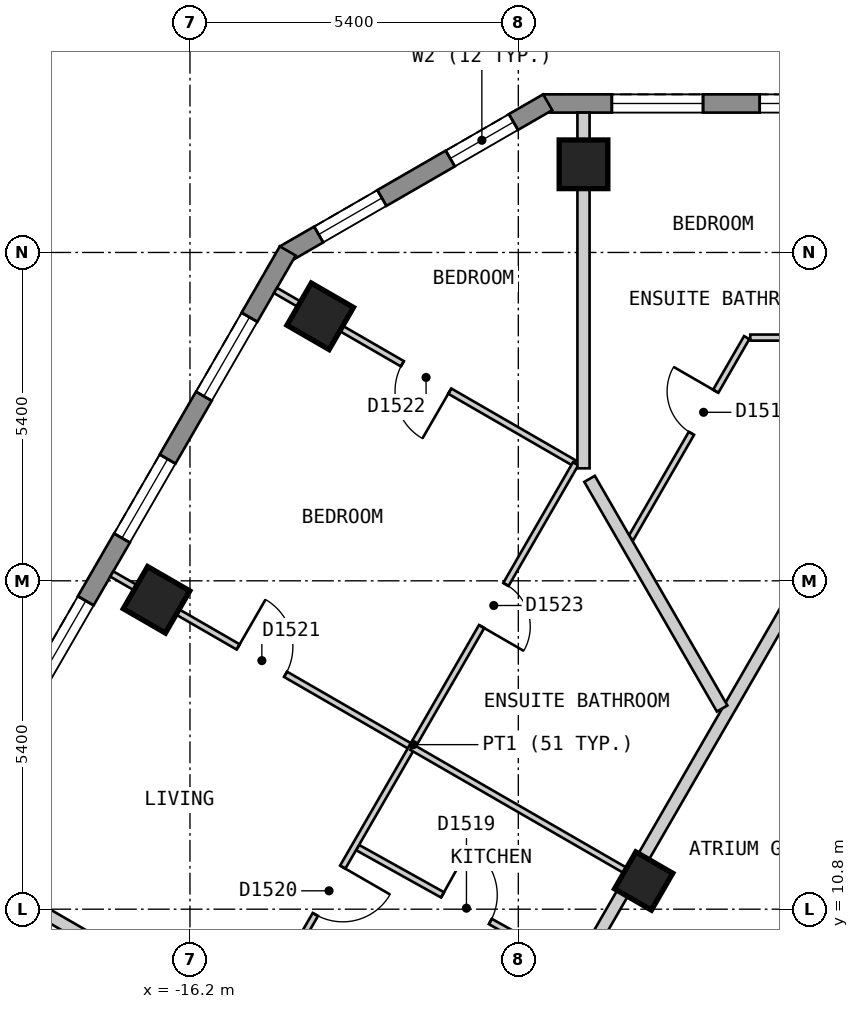
"""IFC4 building model, lengths in metres.
Left out: names, types, materials, properties, quantities, classifications, styles, units other than length and angle.
Written with IfcOpenShell. Run it as: python <this file> out.ifc"""

import sys

from ifc_helpers import new_model, si_unit, direction, frame, frame_2d, origin, origin_2d, place, context, subcontext, project, spatial, polyline, rectangle, outline, extrude, element, fill, save


model = new_model("IFC4")
c1 = context("Model", 3, precision=1e-05, world=origin(), true_north=direction((0.0, 1.0)))
c2 = subcontext(c1, "Body", "Model", "MODEL_VIEW")
j1 = project(units=[si_unit("LENGTHUNIT", "METRE"), si_unit("PLANEANGLEUNIT", "RADIAN")], contexts=[c1])
p1 = place(None, origin())
s1 = spatial("IfcSite", under=j1, at=p1, CompositionType="ELEMENT")
p2 = place(p1, origin())
s2 = spatial("IfcBuilding", under=s1, at=p2, CompositionType="ELEMENT")
p3 = place(p2, frame((0.0, 0.0, 190.2)))
s3 = spatial("IfcBuildingStorey", under=s2, at=p3, CompositionType="ELEMENT", Elevation=190.2)
for number, where, z_axis, x_axis in (
    (1, (-9.728, 23.05, 0.0), (0.0, 0.0, 1.0), (-1.0, 0.0, 0.0)),
    (2, (-14.058, 20.55, 0.0), (0.0, 0.0, 1.0), (-0.5, -0.866, 0.0)),
    (3, (-16.75, 15.888, 0.0), (0.0, 0.0, 1.0), (-0.5, -0.866, 0.0)),
):
    element("IfcColumn", number, at=place(p3, frame(where, z_axis=z_axis, x_axis=x_axis)), inside=s3, PredefinedType="COLUMN", context=c2, shape_type="SweptSolid", body=[
        extrude(rectangle(XDim=0.8, YDim=0.8, at=origin_2d()), origin(), (0.0, 0.0, 1.0), 3.0),
    ])
p4 = place(p3, frame((-8.739, 11.263, 0.0), z_axis=(0.0, 0.0, 1.0), x_axis=(-0.5, -0.866025403784, 0.0)))
e4 = element("IfcColumn", 4, at=p4, inside=s3, PredefinedType="COLUMN", context=c2, shape_type="SweptSolid", body=[
    extrude(rectangle(XDim=0.7, YDim=0.7, at=origin_2d()), origin(), (0.0, 0.0, 1.0), 3.0),
])
p5 = place(p3, frame((10.392, 24.05, 0.0), z_axis=(0.0, 0.0, 1.0), x_axis=(-1.0, 0.0, 0.0)))
e5 = element("IfcWall", 5, at=p5, inside=s3, PredefinedType="SOLIDWALL", context=c2, shape_type="SweptSolid", body=[
    extrude(outline(polyline([(0.0, -0.15), (20.784, -0.15), (20.704, 0.15), (0.08, 0.15), (0.0, -0.15)])), origin(), (0.0, 0.0, 1.0), 2.7),
])
p6 = place(p5, frame((1.13, 0.0, 0.15)))
e6 = element("IfcOpeningElement", 6, at=p6, cuts=e5, PredefinedType="OPENING", context=c2, shape_type="SweptSolid", body=[
    extrude(rectangle(XDim=1.5, YDim=2.1, at=frame_2d((0.75, 1.05))), frame((0.0, 0.16, 0.0), z_axis=(0.0, -1.0, 0.0), x_axis=(1.0, 0.0, 0.0)), (0.0, 0.0, 1.0), 0.32),
])
p7 = place(p5, frame((3.562, 0.0, 0.15)))
e7 = element("IfcOpeningElement", 7, at=p7, cuts=e5, PredefinedType="OPENING", context=c2, shape_type="SweptSolid", body=[
    extrude(rectangle(XDim=1.5, YDim=2.1, at=frame_2d((0.75, 1.05))), frame((0.0, 0.16, 0.0), z_axis=(0.0, -1.0, 0.0), x_axis=(1.0, 0.0, 0.0)), (0.0, 0.0, 1.0), 0.32),
])
p8 = place(p5, frame((5.994, 0.0, 0.15)))
e8 = element("IfcOpeningElement", 8, at=p8, cuts=e5, PredefinedType="OPENING", context=c2, shape_type="SweptSolid", body=[
    extrude(rectangle(XDim=1.5, YDim=2.1, at=frame_2d((0.75, 1.05))), frame((0.0, 0.16, 0.0), z_axis=(0.0, -1.0, 0.0), x_axis=(1.0, 0.0, 0.0)), (0.0, 0.0, 1.0), 0.32),
])
p9 = place(p5, frame((8.426, 0.0, 0.15)))
e9 = element("IfcOpeningElement", 9, at=p9, cuts=e5, PredefinedType="OPENING", context=c2, shape_type="SweptSolid", body=[
    extrude(rectangle(XDim=1.5, YDim=2.1, at=frame_2d((0.75, 1.05))), frame((0.0, 0.16, 0.0), z_axis=(0.0, -1.0, 0.0), x_axis=(1.0, 0.0, 0.0)), (0.0, 0.0, 1.0), 0.32),
])
p10 = place(p5, frame((10.858, 0.0, 0.15)))
e10 = element("IfcOpeningElement", 10, at=p10, cuts=e5, PredefinedType="OPENING", context=c2, shape_type="SweptSolid", body=[
    extrude(rectangle(XDim=1.5, YDim=2.1, at=frame_2d((0.75, 1.05))), frame((0.0, 0.16, 0.0), z_axis=(0.0, -1.0, 0.0), x_axis=(1.0, 0.0, 0.0)), (0.0, 0.0, 1.0), 0.32),
])
p11 = place(p5, frame((13.29, 0.0, 0.15)))
e11 = element("IfcOpeningElement", 11, at=p11, cuts=e5, PredefinedType="OPENING", context=c2, shape_type="SweptSolid", body=[
    extrude(rectangle(XDim=1.5, YDim=2.1, at=frame_2d((0.75, 1.05))), frame((0.0, 0.16, 0.0), z_axis=(0.0, -1.0, 0.0), x_axis=(1.0, 0.0, 0.0)), (0.0, 0.0, 1.0), 0.32),
])
p12 = place(p5, frame((15.722, 0.0, 0.15)))
e12 = element("IfcOpeningElement", 12, at=p12, cuts=e5, PredefinedType="OPENING", context=c2, shape_type="SweptSolid", body=[
    extrude(rectangle(XDim=1.5, YDim=2.1, at=frame_2d((0.75, 1.05))), frame((0.0, 0.16, 0.0), z_axis=(0.0, -1.0, 0.0), x_axis=(1.0, 0.0, 0.0)), (0.0, 0.0, 1.0), 0.32),
])
p13 = place(p5, frame((18.154, 0.0, 0.15)))
e13 = element("IfcOpeningElement", 13, at=p13, cuts=e5, PredefinedType="OPENING", context=c2, shape_type="SweptSolid", body=[
    extrude(rectangle(XDim=1.5, YDim=2.1, at=frame_2d((0.75, 1.05))), frame((0.0, 0.16, 0.0), z_axis=(0.0, -1.0, 0.0), x_axis=(1.0, 0.0, 0.0)), (0.0, 0.0, 1.0), 0.32),
])
p14 = place(p3, frame((-10.317, 24.07, 0.0), z_axis=(0.0, 0.0, 1.0), x_axis=(-0.866022959057, -0.500004234368, 0.0)))
e14 = element("IfcWall", 14, at=p14, inside=s3, PredefinedType="SOLIDWALL", context=c2, shape_type="SweptSolid", body=[
    extrude(outline(polyline([(0.0, -0.15), (5.0, -0.15), (4.92, 0.15), (0.08, 0.15), (0.0, -0.15)])), origin(), (0.0, 0.0, 1.0), 2.7),
])
p15 = place(p14, frame((0.65, 0.0, 0.15)))
e15 = element("IfcOpeningElement", 15, at=p15, cuts=e14, PredefinedType="OPENING", context=c2, shape_type="SweptSolid", body=[
    extrude(rectangle(XDim=1.2, YDim=2.1, at=frame_2d((0.6, 1.05))), frame((0.0, 0.16, 0.0), z_axis=(0.0, -1.0, 0.0), x_axis=(1.0, 0.0, 0.0)), (0.0, 0.0, 1.0), 0.32),
])
p16 = place(p14, frame((3.149, 0.0, 0.15)))
e16 = element("IfcOpeningElement", 16, at=p16, cuts=e14, PredefinedType="OPENING", context=c2, shape_type="SweptSolid", body=[
    extrude(rectangle(XDim=1.2, YDim=2.1, at=frame_2d((0.6, 1.05))), frame((0.0, 0.16, 0.0), z_axis=(0.0, -1.0, 0.0), x_axis=(1.0, 0.0, 0.0)), (0.0, 0.0, 1.0), 0.32),
])
p17 = place(p3, frame((-14.592, 21.625, 0.0), z_axis=(0.0, 0.0, 1.0), x_axis=(-0.500010537973, -0.866019319597, 0.0)))
e17 = element("IfcWall", 17, at=p17, inside=s3, PredefinedType="SOLIDWALL", context=c2, shape_type="SweptSolid", body=[
    extrude(outline(polyline([(0.0, -0.15), (22.863, -0.15), (22.783, 0.15), (0.08, 0.15), (0.0, -0.15)])), origin(), (0.0, 0.0, 1.0), 2.7),
])
p18 = place(p17, frame((1.259, 0.0, 0.15)))
e18 = element("IfcOpeningElement", 18, at=p18, cuts=e17, PredefinedType="OPENING", context=c2, shape_type="SweptSolid", body=[
    extrude(rectangle(XDim=1.5, YDim=2.1, at=frame_2d((0.75, 1.05))), frame((0.0, 0.16, 0.0), z_axis=(0.0, -1.0, 0.0), x_axis=(1.0, 0.0, 0.0)), (0.0, 0.0, 1.0), 0.32),
])
p19 = place(p17, frame((3.952, 0.0, 0.15)))
e19 = element("IfcOpeningElement", 19, at=p19, cuts=e17, PredefinedType="OPENING", context=c2, shape_type="SweptSolid", body=[
    extrude(rectangle(XDim=1.5, YDim=2.1, at=frame_2d((0.75, 1.05))), frame((0.0, 0.16, 0.0), z_axis=(0.0, -1.0, 0.0), x_axis=(1.0, 0.0, 0.0)), (0.0, 0.0, 1.0), 0.32),
])
p20 = place(p17, frame((6.644, 0.0, 0.15)))
e20 = element("IfcOpeningElement", 20, at=p20, cuts=e17, PredefinedType="OPENING", context=c2, shape_type="SweptSolid", body=[
    extrude(rectangle(XDim=1.5, YDim=2.1, at=frame_2d((0.75, 1.05))), frame((0.0, 0.16, 0.0), z_axis=(0.0, -1.0, 0.0), x_axis=(1.0, 0.0, 0.0)), (0.0, 0.0, 1.0), 0.32),
])
p21 = place(p17, frame((9.335, 0.0, 0.15)))
e21 = element("IfcOpeningElement", 21, at=p21, cuts=e17, PredefinedType="OPENING", context=c2, shape_type="SweptSolid", body=[
    extrude(rectangle(XDim=1.5, YDim=2.1, at=frame_2d((0.75, 1.05))), frame((0.0, 0.16, 0.0), z_axis=(0.0, -1.0, 0.0), x_axis=(1.0, 0.0, 0.0)), (0.0, 0.0, 1.0), 0.32),
])
p22 = place(p17, frame((12.028, 0.0, 0.15)))
e22 = element("IfcOpeningElement", 22, at=p22, cuts=e17, PredefinedType="OPENING", context=c2, shape_type="SweptSolid", body=[
    extrude(rectangle(XDim=1.5, YDim=2.1, at=frame_2d((0.75, 1.05))), frame((0.0, 0.16, 0.0), z_axis=(0.0, -1.0, 0.0), x_axis=(1.0, 0.0, 0.0)), (0.0, 0.0, 1.0), 0.32),
])
p23 = place(p17, frame((14.72, 0.0, 0.15)))
e23 = element("IfcOpeningElement", 23, at=p23, cuts=e17, PredefinedType="OPENING", context=c2, shape_type="SweptSolid", body=[
    extrude(rectangle(XDim=1.5, YDim=2.1, at=frame_2d((0.75, 1.05))), frame((0.0, 0.16, 0.0), z_axis=(0.0, -1.0, 0.0), x_axis=(1.0, 0.0, 0.0)), (0.0, 0.0, 1.0), 0.32),
])
p24 = place(p17, frame((17.411, 0.0, 0.15)))
e24 = element("IfcOpeningElement", 24, at=p24, cuts=e17, PredefinedType="OPENING", context=c2, shape_type="SweptSolid", body=[
    extrude(rectangle(XDim=1.5, YDim=2.1, at=frame_2d((0.75, 1.05))), frame((0.0, 0.16, 0.0), z_axis=(0.0, -1.0, 0.0), x_axis=(1.0, 0.0, 0.0)), (0.0, 0.0, 1.0), 0.32),
])
p25 = place(p17, frame((20.104, 0.0, 0.15)))
e25 = element("IfcOpeningElement", 25, at=p25, cuts=e17, PredefinedType="OPENING", context=c2, shape_type="SweptSolid", body=[
    extrude(rectangle(XDim=1.5, YDim=2.1, at=frame_2d((0.75, 1.05))), frame((0.0, 0.16, 0.0), z_axis=(0.0, -1.0, 0.0), x_axis=(1.0, 0.0, 0.0)), (0.0, 0.0, 1.0), 0.32),
])
p26 = place(p3, frame((-10.854, 8.0, 0.0), z_axis=(0.0, 0.0, 1.0), x_axis=(0.499997637144, 0.866026767976, 0.0)))
e26 = element("IfcWall", 26, at=p26, inside=s3, PredefinedType="PARTITIONING", context=c2, shape_type="SweptSolid", body=[
    extrude(rectangle(XDim=10.854, YDim=0.2, at=frame_2d((5.427, 0.0))), origin(), (0.0, 0.0, 1.0), 2.7),
])
p27 = place(p26, frame((0.721, 0.0, 0.0)))
e27 = element("IfcOpeningElement", 27, at=p27, cuts=e26, PredefinedType="OPENING", context=c2, shape_type="SweptSolid", body=[
    extrude(rectangle(XDim=1.0, YDim=2.1, at=frame_2d((0.5, 1.05))), frame((0.0, 0.11, 0.0), z_axis=(0.0, -1.0, 0.0), x_axis=(1.0, 0.0, 0.0)), (0.0, 0.0, 1.0), 0.22),
])
p28 = place(p3, frame((-13.444, 11.814, 0.0), z_axis=(0.0, 0.0, 1.0), x_axis=(0.873653620945, -0.486548405207, 0.0)))
e28 = element("IfcWall", 28, at=p28, inside=s3, PredefinedType="PARTITIONING", context=c2, shape_type="SweptSolid", body=[
    extrude(rectangle(XDim=4.051, YDim=0.1, at=frame_2d((2.025, 0.0))), origin(), (0.0, 0.0, 1.0), 2.7),
])
p29 = place(p28, frame((1.6, 0.0, 0.0)))
e29 = element("IfcOpeningElement", 29, at=p29, cuts=e28, PredefinedType="OPENING", context=c2, shape_type="SweptSolid", body=[
    extrude(rectangle(XDim=0.9, YDim=2.1, at=frame_2d((0.45, 1.05))), frame((0.0, 0.06, 0.0), z_axis=(0.0, -1.0, 0.0), x_axis=(1.0, 0.0, 0.0)), (0.0, 0.0, 1.0), 0.12),
])
p30 = place(p3, frame((-17.486, 16.313, 0.0), z_axis=(0.0, 0.0, 1.0), x_axis=(0.866004402611, -0.500036373335, 0.0)))
e30 = element("IfcWall", 30, at=p30, inside=s3, PredefinedType="PARTITIONING", context=c2, shape_type="SweptSolid", body=[
    extrude(rectangle(XDim=5.7, YDim=0.1, at=frame_2d((2.85, 0.0))), origin(), (0.0, 0.0, 1.0), 2.7),
])
p31 = place(p30, frame((2.4, 0.0, 0.0)))
e31 = element("IfcOpeningElement", 31, at=p31, cuts=e30, PredefinedType="OPENING", context=c2, shape_type="SweptSolid", body=[
    extrude(rectangle(XDim=0.9, YDim=2.1, at=frame_2d((0.45, 1.05))), frame((0.0, 0.06, 0.0), z_axis=(0.0, -1.0, 0.0), x_axis=(1.0, 0.0, 0.0)), (0.0, 0.0, 1.0), 0.12),
])
p32 = place(p3, frame((-14.794, 20.975, 0.0), z_axis=(0.0, 0.0, 1.0), x_axis=(0.865989811779, -0.500061642096, 0.0)))
e32 = element("IfcWall", 32, at=p32, inside=s3, PredefinedType="PARTITIONING", context=c2, shape_type="SweptSolid", body=[
    extrude(rectangle(XDim=5.67, YDim=0.1, at=frame_2d((2.835, 0.0))), origin(), (0.0, 0.0, 1.0), 2.7),
])
p33 = place(p32, frame((2.41, 0.0, 0.0)))
e33 = element("IfcOpeningElement", 33, at=p33, cuts=e32, PredefinedType="OPENING", context=c2, shape_type="SweptSolid", body=[
    extrude(rectangle(XDim=0.9, YDim=2.1, at=frame_2d((0.45, 1.05))), frame((0.0, 0.06, 0.0), z_axis=(0.0, -1.0, 0.0), x_axis=(1.0, 0.0, 0.0)), (0.0, 0.0, 1.0), 0.12),
])
p34 = place(p3, frame((-6.985, 20.2, 0.0), z_axis=(0.0, 0.0, 1.0), x_axis=(1.0, 0.0, 0.0)))
e34 = element("IfcWall", 34, at=p34, inside=s3, PredefinedType="PARTITIONING", context=c2, shape_type="SweptSolid", body=[
    extrude(rectangle(XDim=2.071, YDim=0.1, at=frame_2d((1.036, 0.0))), origin(), (0.0, 0.0, 1.0), 2.7),
])
p35 = place(p3, frame((-8.949, 16.9, 0.0), z_axis=(0.0, 0.0, 1.0), x_axis=(0.499949850951, 0.866054355415, 0.0)))
e35 = element("IfcWall", 35, at=p35, inside=s3, PredefinedType="PARTITIONING", context=c2, shape_type="SweptSolid", body=[
    extrude(rectangle(XDim=3.811, YDim=0.1, at=frame_2d((1.905, 0.0))), origin(), (0.0, 0.0, 1.0), 2.7),
])
p36 = place(p35, frame((1.992, 0.0, 0.0)))
e36 = element("IfcOpeningElement", 36, at=p36, cuts=e35, PredefinedType="OPENING", context=c2, shape_type="SweptSolid", body=[
    extrude(rectangle(XDim=0.8, YDim=2.1, at=frame_2d((0.4, 1.05))), frame((0.0, 0.06, 0.0), z_axis=(0.0, -1.0, 0.0), x_axis=(1.0, 0.0, 0.0)), (0.0, 0.0, 1.0), 0.12),
])
p37 = place(p3, frame((-15.192, 8.887, 0.0), z_axis=(0.0, 0.0, 1.0), x_axis=(0.500028204665, 0.866009119201, 0.0)))
e37 = element("IfcWall", 37, at=p37, inside=s3, PredefinedType="PARTITIONING", context=c2, shape_type="SweptSolid", body=[
    extrude(rectangle(XDim=10.667, YDim=0.1, at=frame_2d((5.334, 0.0))), origin(), (0.0, 0.0, 1.0), 2.7),
])
p38 = place(p37, frame((2.108, 0.0, 0.0)))
e38 = element("IfcOpeningElement", 38, at=p38, cuts=e37, PredefinedType="OPENING", context=c2, shape_type="SweptSolid", body=[
    extrude(rectangle(XDim=0.9, YDim=2.1, at=frame_2d((0.45, 1.05))), frame((0.0, 0.06, 0.0), z_axis=(0.0, -1.0, 0.0), x_axis=(1.0, 0.0, 0.0)), (0.0, 0.0, 1.0), 0.12),
])
p39 = place(p37, frame((7.576, 0.0, 0.0)))
e39 = element("IfcOpeningElement", 39, at=p39, cuts=e37, PredefinedType="OPENING", context=c2, shape_type="SweptSolid", body=[
    extrude(rectangle(XDim=0.8, YDim=2.1, at=frame_2d((0.4, 1.05))), frame((0.0, 0.06, 0.0), z_axis=(0.0, -1.0, 0.0), x_axis=(1.0, 0.0, 0.0)), (0.0, 0.0, 1.0), 0.12),
])
p40 = place(p3, frame((-9.628, 17.877, 0.0), z_axis=(0.0, 0.0, 1.0), x_axis=(0.499890461358, -0.866088636713, 0.0)))
e40 = element("IfcWall", 40, at=p40, inside=s3, PredefinedType="PARTITIONING", context=c2, shape_type="SweptSolid", body=[
    extrude(rectangle(XDim=4.361, YDim=0.2, at=frame_2d((2.18, 0.0))), origin(), (0.0, 0.0, 1.0), 2.7),
])
p41 = place(p3, frame((-20.178, 11.65, 0.0), z_axis=(0.0, 0.0, 1.0), x_axis=(0.866022950691, -0.500004248858, 0.0)))
e41 = element("IfcWall", 41, at=p41, inside=s3, PredefinedType="PARTITIONING", context=c2, shape_type="SweptSolid", body=[
    extrude(rectangle(XDim=5.7, YDim=0.2, at=frame_2d((2.85, 0.0))), origin(), (0.0, 0.0, 1.0), 2.7),
])
p42 = place(p3, frame((-9.728, 18.05, 0.0), z_axis=(0.0, 0.0, 1.0), x_axis=(0.0, 1.0, 0.0)))
e42 = element("IfcWall", 42, at=p42, inside=s3, PredefinedType="PARTITIONING", context=c2, shape_type="SweptSolid", body=[
    extrude(rectangle(XDim=5.85, YDim=0.2, at=frame_2d((2.925, 0.0))), origin(), (0.0, 0.0, 1.0), 2.7),
])
p43 = place(p3, frame((-12.55, 13.463, 0.0), z_axis=(0.0, 0.0, 1.0), x_axis=(0.86606561423, -0.499930346997, 0.0)))
e43 = element("IfcWall", 43, at=p43, inside=s3, PredefinedType="PARTITIONING", context=c2, shape_type="SweptSolid", body=[
    extrude(rectangle(XDim=4.1, YDim=0.1, at=frame_2d((2.05, 0.0))), origin(), (0.0, 0.0, 1.0), 2.7),
])
p44 = place(p12, origin())
e44 = element("IfcWindow", 44, at=p44, inside=s3, PartitioningType="SINGLE_PANEL", PredefinedType="WINDOW", context=c2, shape_type="SweptSolid", body=[
    extrude(rectangle(XDim=1.5, YDim=2.1, at=frame_2d((0.75, 1.05))), frame((0.0, 0.03, 0.0), z_axis=(0.0, -1.0, 0.0), x_axis=(1.0, 0.0, 0.0)), (0.0, 0.0, 1.0), 0.06),
])
fill(e12, e44)
p45 = place(p13, origin())
e45 = element("IfcWindow", 45, at=p45, inside=s3, PartitioningType="SINGLE_PANEL", PredefinedType="WINDOW", context=c2, shape_type="SweptSolid", body=[
    extrude(rectangle(XDim=1.5, YDim=2.1, at=frame_2d((0.75, 1.05))), frame((0.0, 0.03, 0.0), z_axis=(0.0, -1.0, 0.0), x_axis=(1.0, 0.0, 0.0)), (0.0, 0.0, 1.0), 0.06),
])
fill(e13, e45)
p46 = place(p15, origin())
e46 = element("IfcWindow", 46, at=p46, inside=s3, PartitioningType="SINGLE_PANEL", PredefinedType="WINDOW", context=c2, shape_type="SweptSolid", body=[
    extrude(rectangle(XDim=1.2, YDim=2.1, at=frame_2d((0.6, 1.05))), frame((0.0, 0.03, 0.0), z_axis=(0.0, -1.0, 0.0), x_axis=(1.0, 0.0, 0.0)), (0.0, 0.0, 1.0), 0.06),
])
fill(e15, e46)
p47 = place(p16, origin())
e47 = element("IfcWindow", 47, at=p47, inside=s3, PartitioningType="SINGLE_PANEL", PredefinedType="WINDOW", context=c2, shape_type="SweptSolid", body=[
    extrude(rectangle(XDim=1.2, YDim=2.1, at=frame_2d((0.6, 1.05))), frame((0.0, 0.03, 0.0), z_axis=(0.0, -1.0, 0.0), x_axis=(1.0, 0.0, 0.0)), (0.0, 0.0, 1.0), 0.06),
])
fill(e16, e47)
p48 = place(p18, origin())
e48 = element("IfcWindow", 48, at=p48, inside=s3, PartitioningType="SINGLE_PANEL", PredefinedType="WINDOW", context=c2, shape_type="SweptSolid", body=[
    extrude(rectangle(XDim=1.5, YDim=2.1, at=frame_2d((0.75, 1.05))), frame((0.0, 0.03, 0.0), z_axis=(0.0, -1.0, 0.0), x_axis=(1.0, 0.0, 0.0)), (0.0, 0.0, 1.0), 0.06),
])
fill(e18, e48)
p49 = place(p19, origin())
e49 = element("IfcWindow", 49, at=p49, inside=s3, PartitioningType="SINGLE_PANEL", PredefinedType="WINDOW", context=c2, shape_type="SweptSolid", body=[
    extrude(rectangle(XDim=1.5, YDim=2.1, at=frame_2d((0.75, 1.05))), frame((0.0, 0.03, 0.0), z_axis=(0.0, -1.0, 0.0), x_axis=(1.0, 0.0, 0.0)), (0.0, 0.0, 1.0), 0.06),
])
fill(e19, e49)
p50 = place(p20, origin())
e50 = element("IfcWindow", 50, at=p50, inside=s3, PartitioningType="SINGLE_PANEL", PredefinedType="WINDOW", context=c2, shape_type="SweptSolid", body=[
    extrude(rectangle(XDim=1.5, YDim=2.1, at=frame_2d((0.75, 1.05))), frame((0.0, 0.03, 0.0), z_axis=(0.0, -1.0, 0.0), x_axis=(1.0, 0.0, 0.0)), (0.0, 0.0, 1.0), 0.06),
])
fill(e20, e50)
p51 = place(p36, origin())
e51 = element("IfcDoor", 51, at=p51, inside=s3, OperationType="SINGLE_SWING_RIGHT", PredefinedType="DOOR", context=c2, shape_type="SweptSolid", body=[
    extrude(rectangle(XDim=0.8, YDim=2.1, at=frame_2d((0.4, 1.05))), frame((0.0, 0.025, 0.0), z_axis=(0.0, -1.0, 0.0), x_axis=(1.0, 0.0, 0.0)), (0.0, 0.0, 1.0), 0.05),
])
fill(e36, e51)
p52 = place(p29, origin())
e52 = element("IfcDoor", 52, at=p52, inside=s3, OperationType="SINGLE_SWING_LEFT", PredefinedType="DOOR", context=c2, shape_type="SweptSolid", body=[
    extrude(rectangle(XDim=0.9, YDim=2.1, at=frame_2d((0.45, 1.05))), frame((0.0, 0.025, 0.0), z_axis=(0.0, -1.0, 0.0), x_axis=(1.0, 0.0, 0.0)), (0.0, 0.0, 1.0), 0.05),
])
fill(e29, e52)
p53 = place(p38, origin())
e53 = element("IfcDoor", 53, at=p53, inside=s3, OperationType="SINGLE_SWING_RIGHT", PredefinedType="DOOR", context=c2, shape_type="SweptSolid", body=[
    extrude(rectangle(XDim=0.9, YDim=2.1, at=frame_2d((0.45, 1.05))), frame((0.0, 0.025, 0.0), z_axis=(0.0, -1.0, 0.0), x_axis=(1.0, 0.0, 0.0)), (0.0, 0.0, 1.0), 0.05),
])
fill(e38, e53)
p54 = place(p31, origin())
e54 = element("IfcDoor", 54, at=p54, inside=s3, OperationType="SINGLE_SWING_LEFT", PredefinedType="DOOR", context=c2, shape_type="SweptSolid", body=[
    extrude(rectangle(XDim=0.9, YDim=2.1, at=frame_2d((0.45, 1.05))), frame((0.0, 0.025, 0.0), z_axis=(0.0, -1.0, 0.0), x_axis=(1.0, 0.0, 0.0)), (0.0, 0.0, 1.0), 0.05),
])
fill(e31, e54)
p55 = place(p33, origin())
e55 = element("IfcDoor", 55, at=p55, inside=s3, OperationType="SINGLE_SWING_RIGHT", PredefinedType="DOOR", context=c2, shape_type="SweptSolid", body=[
    extrude(rectangle(XDim=0.9, YDim=2.1, at=frame_2d((0.45, 1.05))), frame((0.0, 0.025, 0.0), z_axis=(0.0, -1.0, 0.0), x_axis=(1.0, 0.0, 0.0)), (0.0, 0.0, 1.0), 0.05),
])
fill(e33, e55)
p56 = place(p39, origin())
e56 = element("IfcDoor", 56, at=p56, inside=s3, OperationType="SINGLE_SWING_LEFT", PredefinedType="DOOR", context=c2, shape_type="SweptSolid", body=[
    extrude(rectangle(XDim=0.8, YDim=2.1, at=frame_2d((0.4, 1.05))), frame((0.0, 0.025, 0.0), z_axis=(0.0, -1.0, 0.0), x_axis=(1.0, 0.0, 0.0)), (0.0, 0.0, 1.0), 0.05),
])
fill(e39, e56)
save(model, sys.argv[1])
